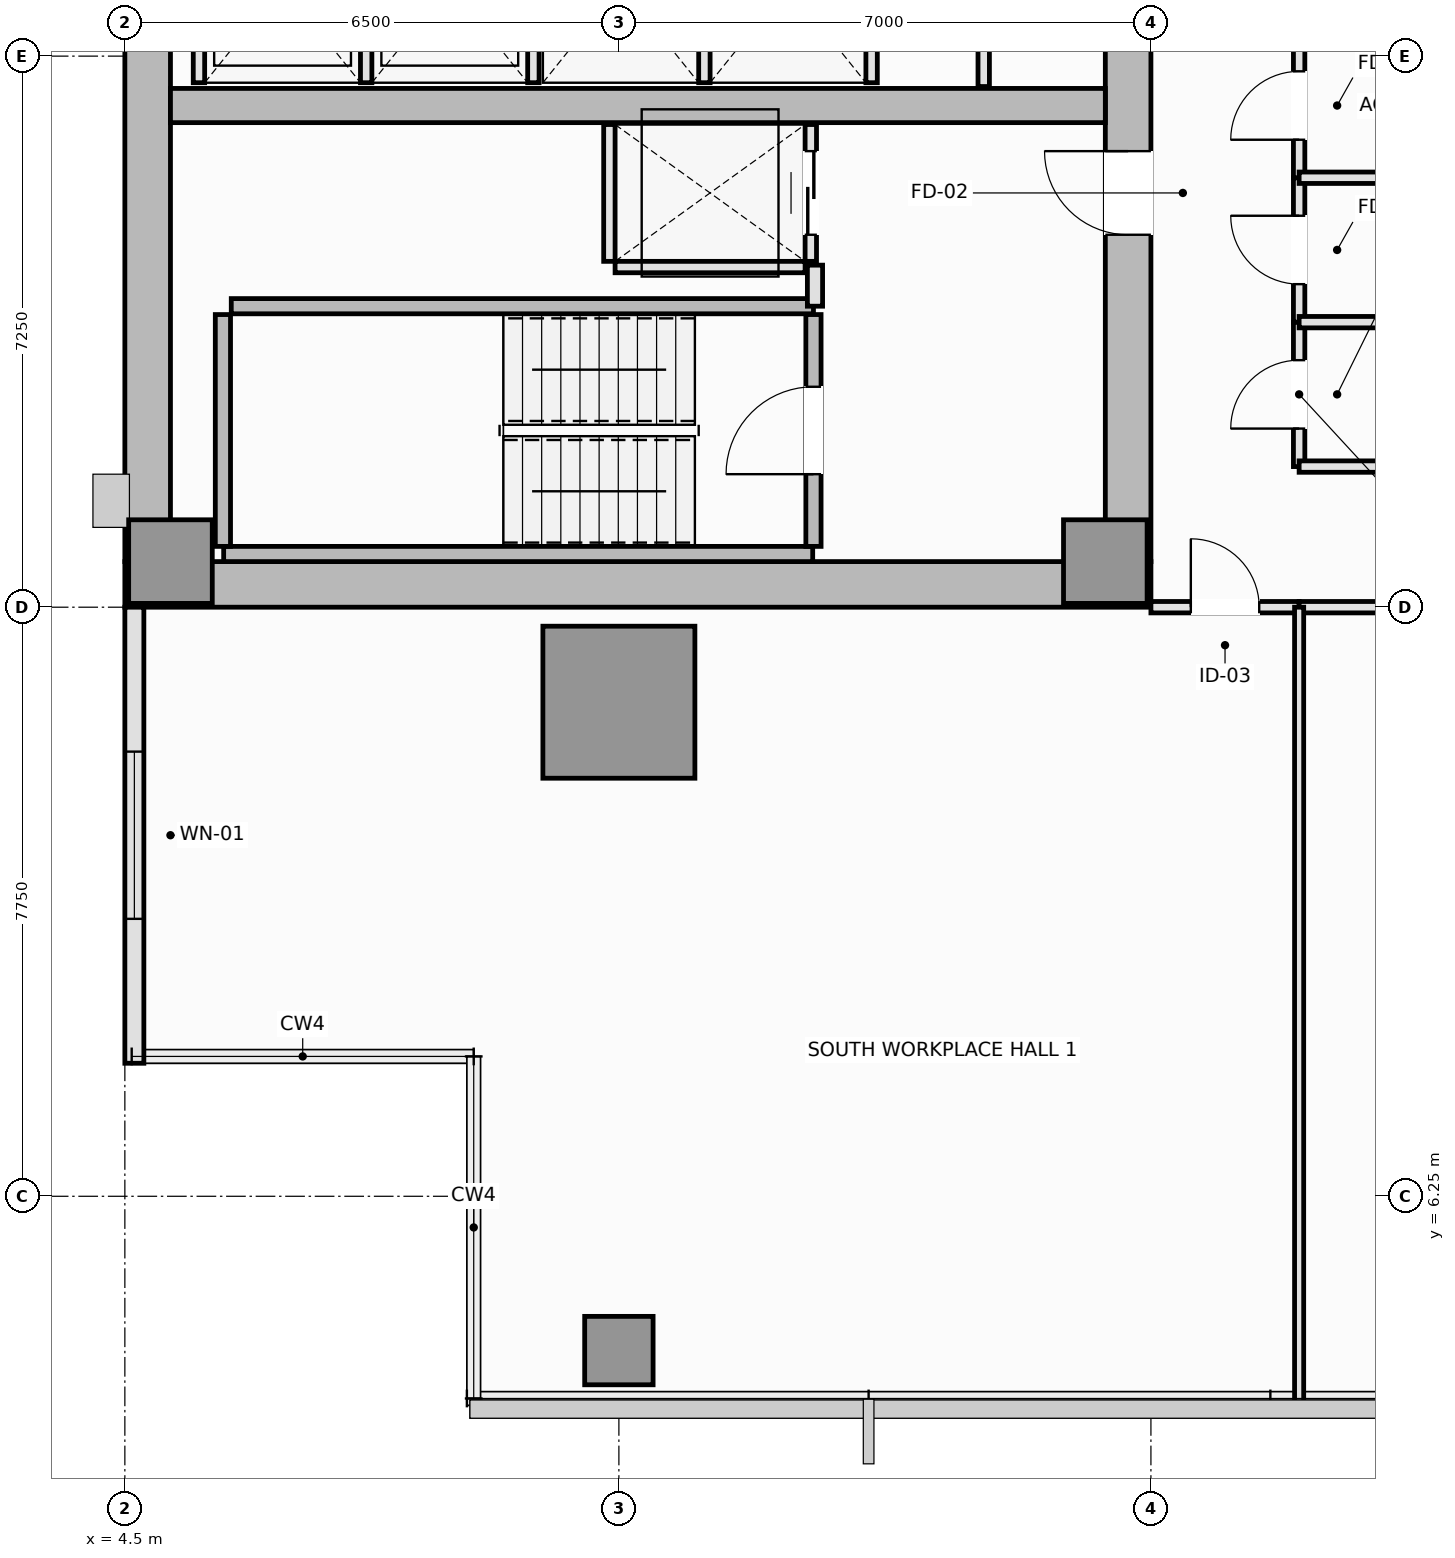
"""IFC4 building model, lengths in metres.
Left out: names, types, materials, properties, quantities, classifications, styles, units other than length and angle.
Written with IfcOpenShell. Run it as: python <this file> out.ifc"""

import sys

from ifc_helpers import new_model, si_unit, direction, frame, frame_2d, origin, origin_2d, place, context, subcontext, project, spatial, rectangle, extrude, element, fill, save


model = new_model("IFC4")
c1 = context("Model", 3, precision=1e-05, world=origin(), true_north=direction((0.0, 1.0)))
c2 = subcontext(c1, "Body", "Model", "MODEL_VIEW")
j1 = project(units=[si_unit("LENGTHUNIT", "METRE"), si_unit("PLANEANGLEUNIT", "RADIAN")], contexts=[c1])
p1 = place(None, origin())
s1 = spatial("IfcSite", under=j1, at=p1, CompositionType="ELEMENT")
p2 = place(p1, origin())
s2 = spatial("IfcBuilding", under=s1, at=p2, CompositionType="ELEMENT")
p3 = place(p2, frame((0.0, 0.0, 134.2)))
s3 = spatial("IfcBuildingStorey", under=s2, at=p3, CompositionType="ELEMENT", Elevation=134.2)
p4 = place(p3, frame((4.5, 14.3, 0.0), z_axis=(0.0, 0.0, 1.0), x_axis=(1.0, 0.0, 0.0)))
e1 = element("IfcWall", 1, at=p4, inside=s3, PredefinedType="SHEAR", context=c2, shape_type="SweptSolid", body=[
    extrude(rectangle(XDim=13.5, YDim=0.6, at=frame_2d((6.75, 0.0))), origin(), (0.0, 0.0, 1.0), 3.55),
])
p5 = place(p3, frame((4.8, 14.6, 0.0), z_axis=(0.0, 0.0, 1.0), x_axis=(0.0, 1.0, 0.0)))
e2 = element("IfcWall", 2, at=p5, inside=s3, PredefinedType="SHEAR", context=c2, shape_type="SweptSolid", body=[
    extrude(rectangle(XDim=21.3, YDim=0.6, at=frame_2d((10.65, 0.0))), origin(), (0.0, 0.0, 1.0), 3.55),
])
p6 = place(p3, frame((17.7, 14.6, 0.0), z_axis=(0.0, 0.0, 1.0), x_axis=(0.0, 1.0, 0.0)))
e3 = element("IfcWall", 3, at=p6, inside=s3, PredefinedType="SHEAR", context=c2, shape_type="SweptSolid", body=[
    extrude(rectangle(XDim=8.85, YDim=0.6, at=frame_2d((4.425, 0.0))), origin(), (0.0, 0.0, 1.0), 3.55),
])
p7 = place(p6, frame((4.3, 0.0, 0.0)))
e4 = element("IfcOpeningElement", 4, at=p7, cuts=e3, PredefinedType="OPENING", context=c2, shape_type="SweptSolid", body=[
    extrude(rectangle(XDim=1.1, YDim=2.15, at=frame_2d((0.55, 1.075))), frame((0.0, 0.31, 0.0), z_axis=(0.0, -1.0, 0.0), x_axis=(1.0, 0.0, 0.0)), (0.0, 0.0, 1.0), 0.62),
])
p8 = place(p3, frame((5.1, 20.6, 0.0), z_axis=(0.0, 0.0, 1.0), x_axis=(1.0, 0.0, 0.0)))
e5 = element("IfcWall", 5, at=p8, inside=s3, PredefinedType="SHEAR", context=c2, shape_type="SweptSolid", body=[
    extrude(rectangle(XDim=12.3, YDim=0.45, at=frame_2d((6.15, 0.0))), origin(), (0.0, 0.0, 1.0), 3.55),
])
for number, where, z_axis, x_axis in (
    (6, (5.1, 14.6, 0.0), (0.0, 0.0, 1.0), (1.0, 0.0, 0.0)),
    (7, (17.4, 14.6, 0.0), (0.0, 0.0, 1.0), (1.0, 0.0, 0.0)),
):
    element("IfcColumn", number, at=place(p3, frame(where, z_axis=z_axis, x_axis=x_axis)), inside=s3, PredefinedType="PILASTER", context=c2, shape_type="SweptSolid", body=[
        extrude(rectangle(XDim=1.1, YDim=1.1, at=origin_2d()), origin(), (0.0, 0.0, 1.0), 3.55),
    ])
p9 = place(p3, frame((11.0, 12.75, 0.0), z_axis=(0.0, 0.0, 1.0), x_axis=(1.0, 0.0, 0.0)))
e8 = element("IfcColumn", 8, at=p9, inside=s3, PredefinedType="COLUMN", context=c2, shape_type="SweptSolid", body=[
    extrude(rectangle(XDim=2.0, YDim=2.0, at=origin_2d()), origin(), (0.0, 0.0, 1.0), 3.55),
])
p10 = place(p3, frame((11.0, 4.22, 0.0), z_axis=(0.0, 0.0, 1.0), x_axis=(1.0, 0.0, 0.0)))
e9 = element("IfcColumn", 9, at=p10, inside=s3, PredefinedType="COLUMN", context=c2, shape_type="SweptSolid", body=[
    extrude(rectangle(XDim=0.9, YDim=0.9, at=origin_2d()), origin(), (0.0, 0.0, 1.0), 3.55),
])
p11 = place(p3, frame((4.625, 14.0, 0.0), z_axis=(0.0, 0.0, 1.0), x_axis=(0.0, -1.0, 0.0)))
e10 = element("IfcWall", 10, at=p11, inside=s3, PredefinedType="SOLIDWALL", context=c2, shape_type="SweptSolid", body=[
    extrude(rectangle(XDim=6.0, YDim=0.25, at=frame_2d((3.0, 0.0))), origin(), (0.0, 0.0, 1.0), 3.37),
])
p12 = place(p11, frame((1.9, 0.0, 0.9)))
e11 = element("IfcOpeningElement", 11, at=p12, cuts=e10, PredefinedType="OPENING", context=c2, shape_type="SweptSolid", body=[
    extrude(rectangle(XDim=2.2, YDim=1.8, at=frame_2d((1.1, 0.9))), frame((0.0, 0.135, 0.0), z_axis=(0.0, -1.0, 0.0), x_axis=(1.0, 0.0, 0.0)), (0.0, 0.0, 1.0), 0.27),
])
p13 = place(p3, frame((5.8, 14.7, 0.0), z_axis=(0.0, 0.0, 1.0), x_axis=(1.0, 0.0, 0.0)))
e12 = element("IfcWall", 12, at=p13, inside=s3, PredefinedType="SOLIDWALL", context=c2, shape_type="SweptSolid", body=[
    extrude(rectangle(XDim=7.75, YDim=0.2, at=frame_2d((3.875, 0.0))), origin(), (0.0, 0.0, 1.0), 3.55),
])
p14 = place(p3, frame((5.79, 14.8, 0.0), z_axis=(0.0, 0.0, 1.0), x_axis=(0.0, 1.0, 0.0)))
e13 = element("IfcWall", 13, at=p14, inside=s3, PredefinedType="SOLIDWALL", context=c2, shape_type="SweptSolid", body=[
    extrude(rectangle(XDim=3.05, YDim=0.2, at=frame_2d((1.525, 0.0))), origin(), (0.0, 0.0, 1.0), 3.55),
])
p15 = place(p3, frame((5.9, 17.96, 0.0), z_axis=(0.0, 0.0, 1.0), x_axis=(1.0, 0.0, 0.0)))
e14 = element("IfcWall", 14, at=p15, inside=s3, PredefinedType="SOLIDWALL", context=c2, shape_type="SweptSolid", body=[
    extrude(rectangle(XDim=7.66, YDim=0.2, at=frame_2d((3.83, 0.0))), origin(), (0.0, 0.0, 1.0), 3.55),
])
p16 = place(p3, frame((13.56, 14.8, 0.0), z_axis=(0.0, 0.0, 1.0), x_axis=(0.0, 1.0, 0.0)))
e15 = element("IfcWall", 15, at=p16, inside=s3, PredefinedType="SOLIDWALL", context=c2, shape_type="SweptSolid", body=[
    extrude(rectangle(XDim=3.05, YDim=0.2, at=frame_2d((1.525, 0.0))), origin(), (0.0, 0.0, 1.0), 3.55),
])
p17 = place(p16, frame((0.95, 0.0, 0.0)))
e16 = element("IfcOpeningElement", 16, at=p17, cuts=e15, PredefinedType="OPENING", context=c2, shape_type="SweptSolid", body=[
    extrude(rectangle(XDim=1.15, YDim=2.15, at=frame_2d((0.575, 1.075))), frame((0.0, 0.11, 0.0), z_axis=(0.0, -1.0, 0.0), x_axis=(1.0, 0.0, 0.0)), (0.0, 0.0, 1.0), 0.22),
])
for number, where, z_axis, x_axis in (
    (17, (5.475, 20.9, 0.0), (0.0, 0.0, 1.0), (0.0, 1.0, 0.0)),
    (18, (7.675, 20.9, 0.0), (0.0, 0.0, 1.0), (0.0, 1.0, 0.0)),
    (19, (9.875, 20.9, 0.0), (0.0, 0.0, 1.0), (0.0, 1.0, 0.0)),
    (20, (12.125, 20.9, 0.0), (0.0, 0.0, 1.0), (0.0, 1.0, 0.0)),
    (21, (14.325, 20.9, 0.0), (0.0, 0.0, 1.0), (0.0, 1.0, 0.0)),
):
    element("IfcWall", number, at=place(p3, frame(where, z_axis=z_axis, x_axis=x_axis)), inside=s3, PredefinedType="PARTITIONING", context=c2, shape_type="SweptSolid", body=[
        extrude(rectangle(XDim=2.55, YDim=0.15, at=frame_2d((1.275, 0.0))), origin(), (0.0, 0.0, 1.0), 3.37),
    ])
p18 = place(p3, frame((10.95, 18.475, 0.0), z_axis=(0.0, 0.0, 1.0), x_axis=(1.0, 0.0, 0.0)))
e22 = element("IfcWall", 22, at=p18, inside=s3, PredefinedType="PARTITIONING", context=c2, shape_type="SweptSolid", body=[
    extrude(rectangle(XDim=2.5, YDim=0.15, at=frame_2d((1.25, 0.0))), origin(), (0.0, 0.0, 1.0), 3.37),
])
p19 = place(p3, frame((10.875, 18.55, 0.0), z_axis=(0.0, 0.0, 1.0), x_axis=(0.0, 1.0, 0.0)))
e23 = element("IfcWall", 23, at=p19, inside=s3, PredefinedType="PARTITIONING", context=c2, shape_type="SweptSolid", body=[
    extrude(rectangle(XDim=1.8, YDim=0.15, at=frame_2d((0.9, 0.0))), origin(), (0.0, 0.0, 1.0), 3.37),
])
p20 = place(p3, frame((13.525, 18.55, 0.0), z_axis=(0.0, 0.0, 1.0), x_axis=(0.0, 1.0, 0.0)))
e24 = element("IfcWall", 24, at=p20, inside=s3, PredefinedType="PARTITIONING", context=c2, shape_type="SweptSolid", body=[
    extrude(rectangle(XDim=1.8, YDim=0.15, at=frame_2d((0.9, 0.0))), origin(), (0.0, 0.0, 1.0), 3.37),
])
p21 = place(p20, frame((0.35, 0.0, 0.0)))
e25 = element("IfcOpeningElement", 25, at=p21, cuts=e24, PredefinedType="OPENING", context=c2, shape_type="SweptSolid", body=[
    extrude(rectangle(XDim=1.1, YDim=2.2, at=frame_2d((0.55, 1.1))), frame((0.0, 0.085, 0.0), z_axis=(0.0, -1.0, 0.0), x_axis=(1.0, 0.0, 0.0)), (0.0, 0.0, 1.0), 0.17),
])
p22 = place(p3, frame((13.58, 17.96, 0.0), z_axis=(0.0, 0.0, 1.0), x_axis=(0.0, 1.0, 0.0)))
e26 = element("IfcWall", 26, at=p22, inside=s3, PredefinedType="PARTITIONING", context=c2, shape_type="SweptSolid", body=[
    extrude(rectangle(XDim=0.54, YDim=0.2, at=frame_2d((0.27, 0.0))), origin(), (0.0, 0.0, 1.0), 3.37),
])
p23 = place(p3, frame((15.8, 20.85, 0.0), z_axis=(0.0, 0.0, 1.0), x_axis=(0.0, 1.0, 0.0)))
e27 = element("IfcWall", 27, at=p23, inside=s3, PredefinedType="PARTITIONING", context=c2, shape_type="SweptSolid", body=[
    extrude(rectangle(XDim=2.67, YDim=0.15, at=frame_2d((1.335, 0.0))), origin(), (0.0, 0.0, 1.0), 3.37),
])
p24 = place(p3, frame((19.95, 15.85, 0.0), z_axis=(0.0, 0.0, 1.0), x_axis=(0.0, 1.0, 0.0)))
e28 = element("IfcWall", 28, at=p24, inside=s3, PredefinedType="PLUMBINGWALL", context=c2, shape_type="SweptSolid", body=[
    extrude(rectangle(XDim=1.9, YDim=0.15, at=frame_2d((0.95, 0.0))), origin(), (0.0, 0.0, 1.0), 3.37),
])
p25 = place(p24, frame((0.5, 0.0, 0.0)))
e29 = element("IfcOpeningElement", 29, at=p25, cuts=e28, PredefinedType="OPENING", context=c2, shape_type="SweptSolid", body=[
    extrude(rectangle(XDim=0.9, YDim=2.1, at=frame_2d((0.45, 1.05))), frame((0.0, 0.085, 0.0), z_axis=(0.0, -1.0, 0.0), x_axis=(1.0, 0.0, 0.0)), (0.0, 0.0, 1.0), 0.17),
])
p26 = place(p3, frame((19.95, 17.75, 0.0), z_axis=(0.0, 0.0, 1.0), x_axis=(0.0, 1.0, 0.0)))
e30 = element("IfcWall", 30, at=p26, inside=s3, PredefinedType="PLUMBINGWALL", context=c2, shape_type="SweptSolid", body=[
    extrude(rectangle(XDim=1.9, YDim=0.15, at=frame_2d((0.95, 0.0))), origin(), (0.0, 0.0, 1.0), 3.37),
])
p27 = place(p26, frame((0.5, 0.0, 0.0)))
e31 = element("IfcOpeningElement", 31, at=p27, cuts=e30, PredefinedType="OPENING", context=c2, shape_type="SweptSolid", body=[
    extrude(rectangle(XDim=0.9, YDim=2.1, at=frame_2d((0.45, 1.05))), frame((0.0, 0.085, 0.0), z_axis=(0.0, -1.0, 0.0), x_axis=(1.0, 0.0, 0.0)), (0.0, 0.0, 1.0), 0.17),
])
p28 = place(p3, frame((19.95, 19.65, 0.0), z_axis=(0.0, 0.0, 1.0), x_axis=(0.0, 1.0, 0.0)))
e32 = element("IfcWall", 32, at=p28, inside=s3, PredefinedType="PLUMBINGWALL", context=c2, shape_type="SweptSolid", body=[
    extrude(rectangle(XDim=1.9, YDim=0.15, at=frame_2d((0.95, 0.0))), origin(), (0.0, 0.0, 1.0), 3.37),
])
p29 = place(p28, frame((0.5, 0.0, 0.0)))
e33 = element("IfcOpeningElement", 33, at=p29, cuts=e32, PredefinedType="OPENING", context=c2, shape_type="SweptSolid", body=[
    extrude(rectangle(XDim=0.9, YDim=2.1, at=frame_2d((0.45, 1.05))), frame((0.0, 0.085, 0.0), z_axis=(0.0, -1.0, 0.0), x_axis=(1.0, 0.0, 0.0)), (0.0, 0.0, 1.0), 0.17),
])
p30 = place(p3, frame((18.0, 14.0, 0.0), z_axis=(0.0, 0.0, 1.0), x_axis=(1.0, 0.0, 0.0)))
e34 = element("IfcWall", 34, at=p30, inside=s3, PredefinedType="PARTITIONING", context=c2, shape_type="SweptSolid", body=[
    extrude(rectangle(XDim=1.95, YDim=0.15, at=frame_2d((0.975, 0.0))), origin(), (0.0, 0.0, 1.0), 3.37),
])
p31 = place(p30, frame((0.525, 0.0, 0.0)))
e35 = element("IfcOpeningElement", 35, at=p31, cuts=e34, PredefinedType="OPENING", context=c2, shape_type="SweptSolid", body=[
    extrude(rectangle(XDim=0.9, YDim=2.1, at=frame_2d((0.45, 1.05))), frame((0.0, 0.085, 0.0), z_axis=(0.0, -1.0, 0.0), x_axis=(1.0, 0.0, 0.0)), (0.0, 0.0, 1.0), 0.17),
])
p32 = place(p3, frame((19.95, 15.85, 0.0), z_axis=(0.0, 0.0, 1.0), x_axis=(1.0, 0.0, 0.0)))
e36 = element("IfcWall", 36, at=p32, inside=s3, PredefinedType="PLUMBINGWALL", context=c2, shape_type="SweptSolid", body=[
    extrude(rectangle(XDim=3.65, YDim=0.15, at=frame_2d((1.825, 0.0))), origin(), (0.0, 0.0, 1.0), 3.37),
])
p33 = place(p3, frame((19.95, 14.0, 0.0), z_axis=(0.0, 0.0, 1.0), x_axis=(1.0, 0.0, 0.0)))
e37 = element("IfcWall", 37, at=p33, inside=s3, PredefinedType="PARTITIONING", context=c2, shape_type="SweptSolid", body=[
    extrude(rectangle(XDim=7.55, YDim=0.15, at=frame_2d((3.775, 0.0))), origin(), (0.0, 0.0, 1.0), 3.37),
])
p34 = place(p33, frame((3.275, 0.0, 0.0)))
e38 = element("IfcOpeningElement", 38, at=p34, cuts=e37, PredefinedType="OPENING", context=c2, shape_type="SweptSolid", body=[
    extrude(rectangle(XDim=1.0, YDim=2.15, at=frame_2d((0.5, 1.075))), frame((0.0, 0.085, 0.0), z_axis=(0.0, -1.0, 0.0), x_axis=(1.0, 0.0, 0.0)), (0.0, 0.0, 1.0), 0.17),
])
for number, where, z_axis, x_axis in (
    (39, (19.95, 17.75, 0.0), (0.0, 0.0, 1.0), (1.0, 0.0, 0.0)),
    (40, (19.95, 19.65, 0.0), (0.0, 0.0, 1.0), (1.0, 0.0, 0.0)),
):
    element("IfcWall", number, at=place(p3, frame(where, z_axis=z_axis, x_axis=x_axis)), inside=s3, PredefinedType="PLUMBINGWALL", context=c2, shape_type="SweptSolid", body=[
        extrude(rectangle(XDim=3.65, YDim=0.15, at=frame_2d((1.825, 0.0))), origin(), (0.0, 0.0, 1.0), 3.37),
    ])
p35 = place(p3, frame((19.95, 3.51, 0.0), z_axis=(0.0, 0.0, 1.0), x_axis=(0.0, 1.0, 0.0)))
e41 = element("IfcWall", 41, at=p35, inside=s3, PredefinedType="PARTITIONING", context=c2, shape_type="SweptSolid", body=[
    extrude(rectangle(XDim=10.49, YDim=0.12, at=frame_2d((5.245, 0.0))), origin(), (0.0, 0.0, 1.0), 3.37),
])
p36 = place(p12, origin())
e42 = element("IfcWindow", 42, at=p36, inside=s3, PartitioningType="SINGLE_PANEL", PredefinedType="WINDOW", context=c2, shape_type="SweptSolid", body=[
    extrude(rectangle(XDim=2.2, YDim=1.8, at=frame_2d((1.1, 0.9))), frame((0.0, 0.03, 0.0), z_axis=(0.0, -1.0, 0.0), x_axis=(1.0, 0.0, 0.0)), (0.0, 0.0, 1.0), 0.06),
])
fill(e11, e42)
p37 = place(p17, origin())
e43 = element("IfcDoor", 43, at=p37, inside=s3, OperationType="SINGLE_SWING_LEFT", PredefinedType="DOOR", context=c2, shape_type="SweptSolid", body=[
    extrude(rectangle(XDim=1.15, YDim=2.15, at=frame_2d((0.575, 1.075))), frame((0.0, 0.025, 0.0), z_axis=(0.0, -1.0, 0.0), x_axis=(1.0, 0.0, 0.0)), (0.0, 0.0, 1.0), 0.05),
])
fill(e16, e43)
p38 = place(p21, origin())
e44 = element("IfcDoor", 44, at=p38, inside=s3, OperationType="DOUBLE_DOOR_SLIDING", PredefinedType="DOOR", context=c2, shape_type="SweptSolid", body=[
    extrude(rectangle(XDim=1.1, YDim=2.2, at=frame_2d((0.55, 1.1))), frame((0.0, 0.025, 0.0), z_axis=(0.0, -1.0, 0.0), x_axis=(1.0, 0.0, 0.0)), (0.0, 0.0, 1.0), 0.05),
])
fill(e25, e44)
p39 = place(p7, origin())
e45 = element("IfcDoor", 45, at=p39, inside=s3, OperationType="SINGLE_SWING_RIGHT", PredefinedType="DOOR", context=c2, shape_type="SweptSolid", body=[
    extrude(rectangle(XDim=1.1, YDim=2.15, at=frame_2d((0.55, 1.075))), frame((0.0, 0.025, 0.0), z_axis=(0.0, -1.0, 0.0), x_axis=(1.0, 0.0, 0.0)), (0.0, 0.0, 1.0), 0.05),
])
fill(e4, e45)
p40 = place(p25, origin())
e46 = element("IfcDoor", 46, at=p40, inside=s3, OperationType="SINGLE_SWING_LEFT", PredefinedType="DOOR", context=c2, shape_type="SweptSolid", body=[
    extrude(rectangle(XDim=0.9, YDim=2.1, at=frame_2d((0.45, 1.05))), frame((0.0, 0.025, 0.0), z_axis=(0.0, -1.0, 0.0), x_axis=(1.0, 0.0, 0.0)), (0.0, 0.0, 1.0), 0.05),
])
fill(e29, e46)
p41 = place(p27, origin())
e47 = element("IfcDoor", 47, at=p41, inside=s3, OperationType="SINGLE_SWING_RIGHT", PredefinedType="DOOR", context=c2, shape_type="SweptSolid", body=[
    extrude(rectangle(XDim=0.9, YDim=2.1, at=frame_2d((0.45, 1.05))), frame((0.0, 0.025, 0.0), z_axis=(0.0, -1.0, 0.0), x_axis=(1.0, 0.0, 0.0)), (0.0, 0.0, 1.0), 0.05),
])
fill(e31, e47)
p42 = place(p29, origin())
e48 = element("IfcDoor", 48, at=p42, inside=s3, OperationType="SINGLE_SWING_LEFT", PredefinedType="DOOR", context=c2, shape_type="SweptSolid", body=[
    extrude(rectangle(XDim=0.9, YDim=2.1, at=frame_2d((0.45, 1.05))), frame((0.0, 0.025, 0.0), z_axis=(0.0, -1.0, 0.0), x_axis=(1.0, 0.0, 0.0)), (0.0, 0.0, 1.0), 0.05),
])
fill(e33, e48)
p43 = place(p31, origin())
e49 = element("IfcDoor", 49, at=p43, inside=s3, OperationType="SINGLE_SWING_LEFT", PredefinedType="DOOR", context=c2, shape_type="SweptSolid", body=[
    extrude(rectangle(XDim=0.9, YDim=2.1, at=frame_2d((0.45, 1.05))), frame((0.0, 0.025, 0.0), z_axis=(0.0, -1.0, 0.0), x_axis=(1.0, 0.0, 0.0)), (0.0, 0.0, 1.0), 0.05),
])
fill(e35, e49)
save(model, sys.argv[1])
